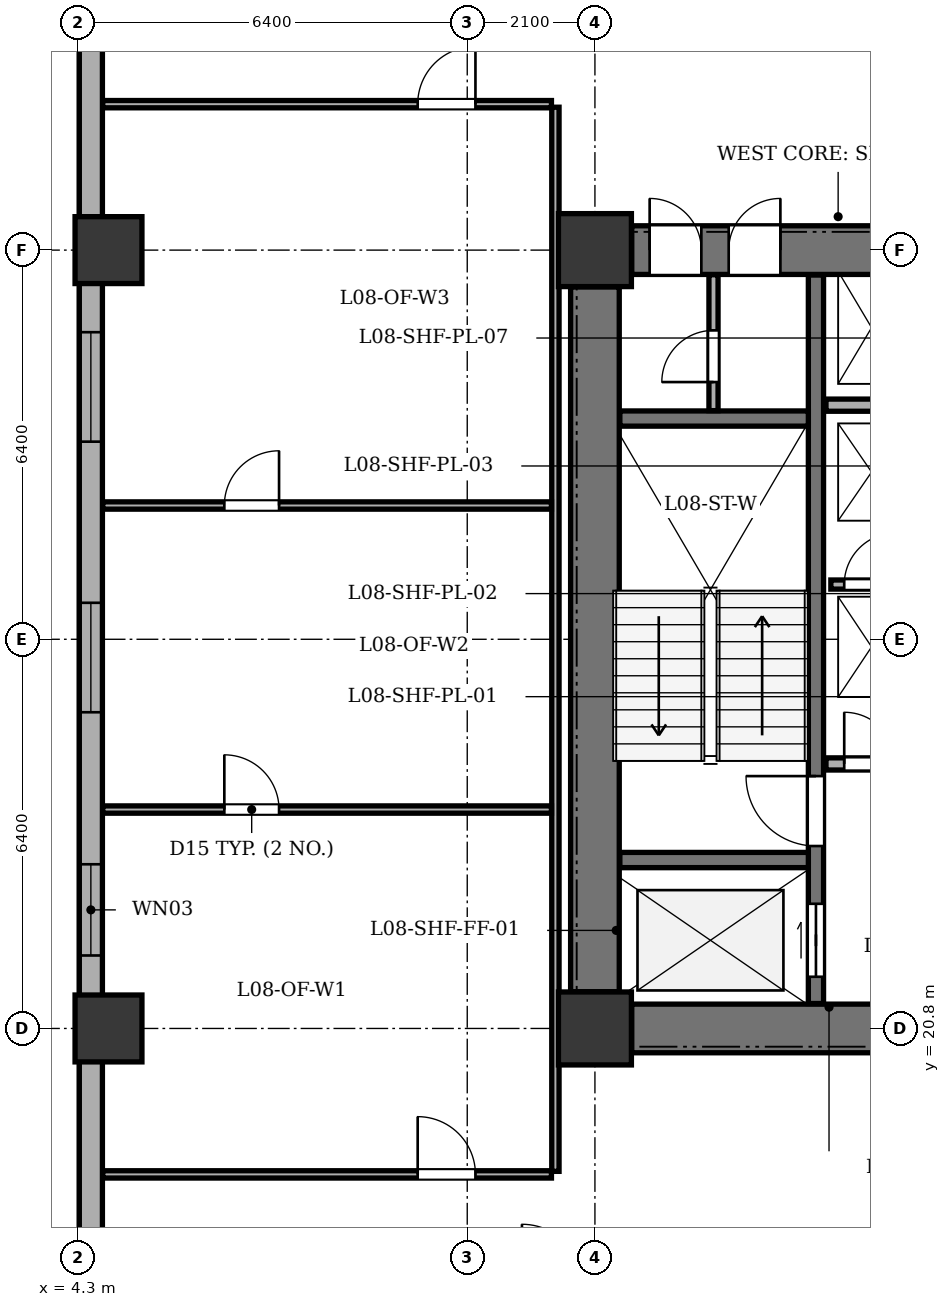
"""IFC4 building model, lengths in metres.
Left out: names, types, materials, properties, quantities, classifications, styles, units other than length and angle.
Written with IfcOpenShell. Run it as: python <this file> out.ifc"""

import sys

from ifc_helpers import new_model, si_unit, direction, frame, frame_2d, origin, origin_2d, place, context, subcontext, project, spatial, rectangle, extrude, element, fill, save


model = new_model("IFC4")
c1 = context("Model", 3, precision=1e-05, world=origin(), true_north=direction((0.0, 1.0)))
c2 = subcontext(c1, "Body", "Model", "MODEL_VIEW")
j1 = project(units=[si_unit("LENGTHUNIT", "METRE"), si_unit("PLANEANGLEUNIT", "RADIAN")], contexts=[c1])
p1 = place(None, origin())
s1 = spatial("IfcSite", under=j1, at=p1, CompositionType="ELEMENT")
p2 = place(p1, origin())
s2 = spatial("IfcBuilding", under=s1, at=p2, CompositionType="ELEMENT")
p3 = place(p2, frame((0.0, 0.0, 36.0)))
s3 = spatial("IfcBuildingStorey", under=s2, at=p3, CompositionType="ELEMENT", Elevation=36.0)
for number, where, z_axis, x_axis in (
    (1, (12.8, 20.8, 0.0), (0.0, 0.0, 1.0), (1.0, 0.0, 0.0)),
    (2, (12.8, 33.6, 0.0), (0.0, 0.0, 1.0), (1.0, 0.0, 0.0)),
):
    element("IfcColumn", number, at=place(p3, frame(where, z_axis=z_axis, x_axis=x_axis)), inside=s3, PredefinedType="COLUMN", context=c2, shape_type="SweptSolid", body=[
        extrude(rectangle(XDim=1.2, YDim=1.2, at=origin_2d()), origin(), (0.0, 0.0, 1.0), 3.9),
    ])
for number, where, z_axis, x_axis in (
    (3, (4.8, 20.8, 0.0), (0.0, 0.0, 1.0), (1.0, 0.0, 0.0)),
    (4, (4.8, 33.6, 0.0), (0.0, 0.0, 1.0), (1.0, 0.0, 0.0)),
):
    element("IfcColumn", number, at=place(p3, frame(where, z_axis=z_axis, x_axis=x_axis)), inside=s3, PredefinedType="COLUMN", context=c2, shape_type="SweptSolid", body=[
        extrude(rectangle(XDim=1.1, YDim=1.1, at=origin_2d()), origin(), (0.0, 0.0, 1.0), 3.9),
    ])
p4 = place(p3, frame((4.51, 6.5, 0.0), z_axis=(0.0, 0.0, 1.0), x_axis=(0.0, 1.0, 0.0)))
e5 = element("IfcWall", 5, at=p4, inside=s3, PredefinedType="STANDARD", context=c2, shape_type="SweptSolid", body=[
    extrude(rectangle(XDim=35.0, YDim=0.38, at=frame_2d((17.5, 0.0))), origin(), (0.0, 0.0, 1.0), 3.135),
])
p5 = place(p4, frame((2.693, 0.0, 0.8)))
e6 = element("IfcOpeningElement", 6, at=p5, cuts=e5, PredefinedType="OPENING", context=c2, shape_type="SweptSolid", body=[
    extrude(rectangle(XDim=1.8, YDim=1.9, at=frame_2d((0.9, 0.95))), frame((0.0, 0.2, 0.0), z_axis=(0.0, -1.0, 0.0), x_axis=(1.0, 0.0, 0.0)), (0.0, 0.0, 1.0), 0.4),
])
p6 = place(p4, frame((7.457, 0.0, 0.8)))
e7 = element("IfcOpeningElement", 7, at=p6, cuts=e5, PredefinedType="OPENING", context=c2, shape_type="SweptSolid", body=[
    extrude(rectangle(XDim=2.4, YDim=1.9, at=frame_2d((1.2, 0.95))), frame((0.0, 0.2, 0.0), z_axis=(0.0, -1.0, 0.0), x_axis=(1.0, 0.0, 0.0)), (0.0, 0.0, 1.0), 0.4),
])
p7 = place(p4, frame((15.5, 0.0, 0.8)))
e8 = element("IfcOpeningElement", 8, at=p7, cuts=e5, PredefinedType="OPENING", context=c2, shape_type="SweptSolid", body=[
    extrude(rectangle(XDim=1.5, YDim=1.9, at=frame_2d((0.75, 0.95))), frame((0.0, 0.2, 0.0), z_axis=(0.0, -1.0, 0.0), x_axis=(1.0, 0.0, 0.0)), (0.0, 0.0, 1.0), 0.4),
])
p8 = place(p4, frame((19.5, 0.0, 0.8)))
e9 = element("IfcOpeningElement", 9, at=p8, cuts=e5, PredefinedType="OPENING", context=c2, shape_type="SweptSolid", body=[
    extrude(rectangle(XDim=1.8, YDim=1.9, at=frame_2d((0.9, 0.95))), frame((0.0, 0.2, 0.0), z_axis=(0.0, -1.0, 0.0), x_axis=(1.0, 0.0, 0.0)), (0.0, 0.0, 1.0), 0.4),
])
p9 = place(p4, frame((23.95, 0.0, 0.8)))
e10 = element("IfcOpeningElement", 10, at=p9, cuts=e5, PredefinedType="OPENING", context=c2, shape_type="SweptSolid", body=[
    extrude(rectangle(XDim=1.8, YDim=1.9, at=frame_2d((0.9, 0.95))), frame((0.0, 0.2, 0.0), z_axis=(0.0, -1.0, 0.0), x_axis=(1.0, 0.0, 0.0)), (0.0, 0.0, 1.0), 0.4),
])
p10 = place(p4, frame((31.175, 0.0, 0.8)))
e11 = element("IfcOpeningElement", 11, at=p10, cuts=e5, PredefinedType="OPENING", context=c2, shape_type="SweptSolid", body=[
    extrude(rectangle(XDim=1.8, YDim=1.9, at=frame_2d((0.9, 0.95))), frame((0.0, 0.2, 0.0), z_axis=(0.0, -1.0, 0.0), x_axis=(1.0, 0.0, 0.0)), (0.0, 0.0, 1.0), 0.4),
])
p11 = place(p3, frame((12.8, 21.405, 0.0), z_axis=(0.0, 0.0, 1.0), x_axis=(0.0, 1.0, 0.0)))
e12 = element("IfcWall", 12, at=p11, inside=s3, PredefinedType="SHEAR", context=c2, shape_type="SweptSolid", body=[
    extrude(rectangle(XDim=11.59, YDim=0.8, at=frame_2d((5.795, 0.0))), origin(), (0.0, 0.0, 1.0), 3.6),
])
p12 = place(p3, frame((13.405, 20.8, 0.0), z_axis=(0.0, 0.0, 1.0), x_axis=(1.0, 0.0, 0.0)))
e13 = element("IfcWall", 13, at=p12, inside=s3, PredefinedType="SHEAR", context=c2, shape_type="SweptSolid", body=[
    extrude(rectangle(XDim=6.79, YDim=0.8, at=frame_2d((3.395, 0.0))), origin(), (0.0, 0.0, 1.0), 3.6),
])
p13 = place(p3, frame((13.405, 33.6, 0.0), z_axis=(0.0, 0.0, 1.0), x_axis=(1.0, 0.0, 0.0)))
e14 = element("IfcWall", 14, at=p13, inside=s3, PredefinedType="SHEAR", context=c2, shape_type="SweptSolid", body=[
    extrude(rectangle(XDim=6.79, YDim=0.8, at=frame_2d((3.395, 0.0))), origin(), (0.0, 0.0, 1.0), 3.6),
])
p14 = place(p13, frame((0.295, 0.0, 0.0)))
e15 = element("IfcOpeningElement", 15, at=p14, cuts=e14, PredefinedType="OPENING", context=c2, shape_type="SweptSolid", body=[
    extrude(rectangle(XDim=0.85, YDim=2.02, at=frame_2d((0.425, 1.01))), frame((0.0, 0.41, 0.0), z_axis=(0.0, -1.0, 0.0), x_axis=(1.0, 0.0, 0.0)), (0.0, 0.0, 1.0), 0.82),
])
p15 = place(p13, frame((1.595, 0.0, 0.0)))
e16 = element("IfcOpeningElement", 16, at=p15, cuts=e14, PredefinedType="OPENING", context=c2, shape_type="SweptSolid", body=[
    extrude(rectangle(XDim=0.85, YDim=2.02, at=frame_2d((0.425, 1.01))), frame((0.0, 0.41, 0.0), z_axis=(0.0, -1.0, 0.0), x_axis=(1.0, 0.0, 0.0)), (0.0, 0.0, 1.0), 0.82),
])
p16 = place(p3, frame((16.435, 21.21, 0.0), z_axis=(0.0, 0.0, 1.0), x_axis=(0.0, 1.0, 0.0)))
e17 = element("IfcWall", 17, at=p16, inside=s3, PredefinedType="SHEAR", context=c2, shape_type="SweptSolid", body=[
    extrude(rectangle(XDim=11.98, YDim=0.25, at=frame_2d((5.99, 0.0))), origin(), (0.0, 0.0, 1.0), 3.6),
])
p17 = place(p16, frame((0.44, 0.0, 0.0)))
e18 = element("IfcOpeningElement", 18, at=p17, cuts=e17, PredefinedType="OPENING", context=c2, shape_type="SweptSolid", body=[
    extrude(rectangle(XDim=1.2, YDim=2.15, at=frame_2d((0.6, 1.075))), frame((0.0, 0.135, 0.0), z_axis=(0.0, -1.0, 0.0), x_axis=(1.0, 0.0, 0.0)), (0.0, 0.0, 1.0), 0.27),
])
p18 = place(p16, frame((2.59, 0.0, 0.0)))
e19 = element("IfcOpeningElement", 19, at=p18, cuts=e17, PredefinedType="OPENING", context=c2, shape_type="SweptSolid", body=[
    extrude(rectangle(XDim=1.15, YDim=2.15, at=frame_2d((0.575, 1.075))), frame((0.0, 0.135, 0.0), z_axis=(0.0, -1.0, 0.0), x_axis=(1.0, 0.0, 0.0)), (0.0, 0.0, 1.0), 0.27),
])
for number, where, z_axis, x_axis in (
    (20, (13.21, 23.57, 0.0), (0.0, 0.0, 1.0), (1.0, 0.0, 0.0)),
    (21, (13.21, 30.83, 0.0), (0.0, 0.0, 1.0), (1.0, 0.0, 0.0)),
):
    element("IfcWall", number, at=place(p3, frame(where, z_axis=z_axis, x_axis=x_axis)), inside=s3, PredefinedType="SHEAR", context=c2, shape_type="SweptSolid", body=[
        extrude(rectangle(XDim=3.1, YDim=0.25, at=frame_2d((1.55, 0.0))), origin(), (0.0, 0.0, 1.0), 3.6),
    ])
p19 = place(p3, frame((16.6, 25.15, 0.0), z_axis=(0.0, 0.0, 1.0), x_axis=(1.0, 0.0, 0.0)))
e22 = element("IfcWall", 22, at=p19, inside=s3, PredefinedType="SOLIDWALL", context=c2, shape_type="SweptSolid", body=[
    extrude(rectangle(XDim=3.79, YDim=0.2, at=frame_2d((1.895, 0.0))), origin(), (0.0, 0.0, 1.0), 3.6),
])
p20 = place(p19, frame((0.3, 0.0, 0.0)))
e23 = element("IfcOpeningElement", 23, at=p20, cuts=e22, PredefinedType="OPENING", context=c2, shape_type="SweptSolid", body=[
    extrude(rectangle(XDim=0.85, YDim=2.02, at=frame_2d((0.425, 1.01))), frame((0.0, 0.11, 0.0), z_axis=(0.0, -1.0, 0.0), x_axis=(1.0, 0.0, 0.0)), (0.0, 0.0, 1.0), 0.22),
])
p21 = place(p3, frame((16.6, 31.05, 0.0), z_axis=(0.0, 0.0, 1.0), x_axis=(1.0, 0.0, 0.0)))
e24 = element("IfcWall", 24, at=p21, inside=s3, PredefinedType="SOLIDWALL", context=c2, shape_type="SweptSolid", body=[
    extrude(rectangle(XDim=3.85, YDim=0.2, at=frame_2d((1.925, 0.0))), origin(), (0.0, 0.0, 1.0), 3.6),
])
p22 = place(p3, frame((14.75, 30.96, 0.0), z_axis=(0.0, 0.0, 1.0), x_axis=(0.0, 1.0, 0.0)))
e25 = element("IfcWall", 25, at=p22, inside=s3, PredefinedType="PARTITIONING", context=c2, shape_type="SweptSolid", body=[
    extrude(rectangle(XDim=2.235, YDim=0.15, at=frame_2d((1.118, 0.0))), origin(), (0.0, 0.0, 1.0), 3.6),
])
p23 = place(p22, frame((0.47, 0.0, 0.0)))
e26 = element("IfcOpeningElement", 26, at=p23, cuts=e25, PredefinedType="OPENING", context=c2, shape_type="SweptSolid", body=[
    extrude(rectangle(XDim=0.85, YDim=2.02, at=frame_2d((0.425, 1.01))), frame((0.0, 0.085, 0.0), z_axis=(0.0, -1.0, 0.0), x_axis=(1.0, 0.0, 0.0)), (0.0, 0.0, 1.0), 0.17),
])
p24 = place(p3, frame((16.68, 28.1, 0.0), z_axis=(0.0, 0.0, 1.0), x_axis=(1.0, 0.0, 0.0)))
e27 = element("IfcWall", 27, at=p24, inside=s3, PredefinedType="PARTITIONING", context=c2, shape_type="SweptSolid", body=[
    extrude(rectangle(XDim=1.32, YDim=0.15, at=frame_2d((0.66, 0.0))), origin(), (0.0, 0.0, 1.0), 3.6),
])
p25 = place(p24, frame((0.22, 0.0, 0.0)))
e28 = element("IfcOpeningElement", 28, at=p25, cuts=e27, PredefinedType="OPENING", context=c2, shape_type="SweptSolid", body=[
    extrude(rectangle(XDim=0.85, YDim=2.02, at=frame_2d((0.425, 1.01))), frame((0.0, 0.085, 0.0), z_axis=(0.0, -1.0, 0.0), x_axis=(1.0, 0.0, 0.0)), (0.0, 0.0, 1.0), 0.17),
])
p26 = place(p3, frame((12.15, 18.45, 0.0), z_axis=(0.0, 0.0, 1.0), x_axis=(0.0, 1.0, 0.0)))
e29 = element("IfcWall", 29, at=p26, inside=s3, PredefinedType="PARTITIONING", context=c2, shape_type="SweptSolid", body=[
    extrude(rectangle(XDim=17.5, YDim=0.12, at=frame_2d((8.75, 0.0))), origin(), (0.0, 0.0, 1.0), 3.6),
])
p27 = place(p3, frame((4.705, 18.4, 0.0), z_axis=(0.0, 0.0, 1.0), x_axis=(1.0, 0.0, 0.0)))
e30 = element("IfcWall", 30, at=p27, inside=s3, PredefinedType="PARTITIONING", context=c2, shape_type="SweptSolid", body=[
    extrude(rectangle(XDim=7.38, YDim=0.12, at=frame_2d((3.69, 0.0))), origin(), (0.0, 0.0, 1.0), 3.6),
])
p28 = place(p27, frame((5.18, 0.0, 0.0)))
e31 = element("IfcOpeningElement", 31, at=p28, cuts=e30, PredefinedType="OPENING", context=c2, shape_type="SweptSolid", body=[
    extrude(rectangle(XDim=0.95, YDim=2.1, at=frame_2d((0.475, 1.05))), frame((0.0, 0.07, 0.0), z_axis=(0.0, -1.0, 0.0), x_axis=(1.0, 0.0, 0.0)), (0.0, 0.0, 1.0), 0.14),
])
p29 = place(p3, frame((4.705, 36.0, 0.0), z_axis=(0.0, 0.0, 1.0), x_axis=(1.0, 0.0, 0.0)))
e32 = element("IfcWall", 32, at=p29, inside=s3, PredefinedType="PARTITIONING", context=c2, shape_type="SweptSolid", body=[
    extrude(rectangle(XDim=7.38, YDim=0.12, at=frame_2d((3.69, 0.0))), origin(), (0.0, 0.0, 1.0), 3.6),
])
p30 = place(p29, frame((5.18, 0.0, 0.0)))
e33 = element("IfcOpeningElement", 33, at=p30, cuts=e32, PredefinedType="OPENING", context=c2, shape_type="SweptSolid", body=[
    extrude(rectangle(XDim=0.95, YDim=2.1, at=frame_2d((0.475, 1.05))), frame((0.0, 0.07, 0.0), z_axis=(0.0, -1.0, 0.0), x_axis=(1.0, 0.0, 0.0)), (0.0, 0.0, 1.0), 0.14),
])
p31 = place(p3, frame((4.705, 24.4, 0.0), z_axis=(0.0, 0.0, 1.0), x_axis=(1.0, 0.0, 0.0)))
e34 = element("IfcWall", 34, at=p31, inside=s3, PredefinedType="PARTITIONING", context=c2, shape_type="SweptSolid", body=[
    extrude(rectangle(XDim=7.38, YDim=0.12, at=frame_2d((3.69, 0.0))), origin(), (0.0, 0.0, 1.0), 3.6),
])
p32 = place(p31, frame((2.0, 0.0, 0.0)))
e35 = element("IfcOpeningElement", 35, at=p32, cuts=e34, PredefinedType="OPENING", context=c2, shape_type="SweptSolid", body=[
    extrude(rectangle(XDim=0.9, YDim=2.05, at=frame_2d((0.45, 1.025))), frame((0.0, 0.07, 0.0), z_axis=(0.0, -1.0, 0.0), x_axis=(1.0, 0.0, 0.0)), (0.0, 0.0, 1.0), 0.14),
])
p33 = place(p3, frame((4.705, 29.4, 0.0), z_axis=(0.0, 0.0, 1.0), x_axis=(1.0, 0.0, 0.0)))
e36 = element("IfcWall", 36, at=p33, inside=s3, PredefinedType="PARTITIONING", context=c2, shape_type="SweptSolid", body=[
    extrude(rectangle(XDim=7.38, YDim=0.12, at=frame_2d((3.69, 0.0))), origin(), (0.0, 0.0, 1.0), 3.6),
])
p34 = place(p33, frame((2.0, 0.0, 0.0)))
e37 = element("IfcOpeningElement", 37, at=p34, cuts=e36, PredefinedType="OPENING", context=c2, shape_type="SweptSolid", body=[
    extrude(rectangle(XDim=0.9, YDim=2.05, at=frame_2d((0.45, 1.025))), frame((0.0, 0.07, 0.0), z_axis=(0.0, -1.0, 0.0), x_axis=(1.0, 0.0, 0.0)), (0.0, 0.0, 1.0), 0.14),
])
p35 = place(p7, origin())
e38 = element("IfcWindow", 38, at=p35, inside=s3, PartitioningType="SINGLE_PANEL", PredefinedType="WINDOW", context=c2, shape_type="SweptSolid", body=[
    extrude(rectangle(XDim=1.5, YDim=1.9, at=frame_2d((0.75, 0.95))), frame((0.0, -0.01, 0.0), z_axis=(0.0, -1.0, 0.0), x_axis=(1.0, 0.0, 0.0)), (0.0, 0.0, 1.0), 0.06),
])
fill(e8, e38)
p36 = place(p8, origin())
e39 = element("IfcWindow", 39, at=p36, inside=s3, PartitioningType="SINGLE_PANEL", PredefinedType="WINDOW", context=c2, shape_type="SweptSolid", body=[
    extrude(rectangle(XDim=1.8, YDim=1.9, at=frame_2d((0.9, 0.95))), frame((0.0, -0.01, 0.0), z_axis=(0.0, -1.0, 0.0), x_axis=(1.0, 0.0, 0.0)), (0.0, 0.0, 1.0), 0.06),
])
fill(e9, e39)
p37 = place(p9, origin())
e40 = element("IfcWindow", 40, at=p37, inside=s3, PartitioningType="SINGLE_PANEL", PredefinedType="WINDOW", context=c2, shape_type="SweptSolid", body=[
    extrude(rectangle(XDim=1.8, YDim=1.9, at=frame_2d((0.9, 0.95))), frame((0.0, -0.01, 0.0), z_axis=(0.0, -1.0, 0.0), x_axis=(1.0, 0.0, 0.0)), (0.0, 0.0, 1.0), 0.06),
])
fill(e10, e40)
p38 = place(p14, origin())
e41 = element("IfcDoor", 41, at=p38, inside=s3, OperationType="SINGLE_SWING_LEFT", PredefinedType="DOOR", context=c2, shape_type="SweptSolid", body=[
    extrude(rectangle(XDim=0.85, YDim=2.02, at=frame_2d((0.425, 1.01))), frame((0.0, 0.025, 0.0), z_axis=(0.0, -1.0, 0.0), x_axis=(1.0, 0.0, 0.0)), (0.0, 0.0, 1.0), 0.05),
])
fill(e15, e41)
p39 = place(p15, origin())
e42 = element("IfcDoor", 42, at=p39, inside=s3, OperationType="SINGLE_SWING_RIGHT", PredefinedType="DOOR", context=c2, shape_type="SweptSolid", body=[
    extrude(rectangle(XDim=0.85, YDim=2.02, at=frame_2d((0.425, 1.01))), frame((0.0, 0.025, 0.0), z_axis=(0.0, -1.0, 0.0), x_axis=(1.0, 0.0, 0.0)), (0.0, 0.0, 1.0), 0.05),
])
fill(e16, e42)
p40 = place(p17, origin())
e43 = element("IfcDoor", 43, at=p40, inside=s3, OperationType="DOUBLE_DOOR_SLIDING", PredefinedType="DOOR", context=c2, shape_type="SweptSolid", body=[
    extrude(rectangle(XDim=1.2, YDim=2.15, at=frame_2d((0.6, 1.075))), frame((0.0, 0.025, 0.0), z_axis=(0.0, -1.0, 0.0), x_axis=(1.0, 0.0, 0.0)), (0.0, 0.0, 1.0), 0.05),
])
fill(e18, e43)
p41 = place(p18, origin())
e44 = element("IfcDoor", 44, at=p41, inside=s3, OperationType="SINGLE_SWING_RIGHT", PredefinedType="DOOR", context=c2, shape_type="SweptSolid", body=[
    extrude(rectangle(XDim=1.15, YDim=2.15, at=frame_2d((0.575, 1.075))), frame((0.0, 0.025, 0.0), z_axis=(0.0, -1.0, 0.0), x_axis=(1.0, 0.0, 0.0)), (0.0, 0.0, 1.0), 0.05),
])
fill(e19, e44)
p42 = place(p20, origin())
e45 = element("IfcDoor", 45, at=p42, inside=s3, OperationType="SINGLE_SWING_LEFT", PredefinedType="DOOR", context=c2, shape_type="SweptSolid", body=[
    extrude(rectangle(XDim=0.85, YDim=2.02, at=frame_2d((0.425, 1.01))), frame((0.0, 0.025, 0.0), z_axis=(0.0, -1.0, 0.0), x_axis=(1.0, 0.0, 0.0)), (0.0, 0.0, 1.0), 0.05),
])
fill(e23, e45)
p43 = place(p23, origin())
e46 = element("IfcDoor", 46, at=p43, inside=s3, OperationType="SINGLE_SWING_LEFT", PredefinedType="DOOR", context=c2, shape_type="SweptSolid", body=[
    extrude(rectangle(XDim=0.85, YDim=2.02, at=frame_2d((0.425, 1.01))), frame((0.0, 0.025, 0.0), z_axis=(0.0, -1.0, 0.0), x_axis=(1.0, 0.0, 0.0)), (0.0, 0.0, 1.0), 0.05),
])
fill(e26, e46)
p44 = place(p25, origin())
e47 = element("IfcDoor", 47, at=p44, inside=s3, OperationType="SINGLE_SWING_RIGHT", PredefinedType="DOOR", context=c2, shape_type="SweptSolid", body=[
    extrude(rectangle(XDim=0.85, YDim=2.02, at=frame_2d((0.425, 1.01))), frame((0.0, 0.025, 0.0), z_axis=(0.0, -1.0, 0.0), x_axis=(1.0, 0.0, 0.0)), (0.0, 0.0, 1.0), 0.05),
])
fill(e28, e47)
p45 = place(p32, origin())
e48 = element("IfcDoor", 48, at=p45, inside=s3, OperationType="SINGLE_SWING_LEFT", PredefinedType="DOOR", context=c2, shape_type="SweptSolid", body=[
    extrude(rectangle(XDim=0.9, YDim=2.05, at=frame_2d((0.45, 1.025))), frame((0.0, 0.025, 0.0), z_axis=(0.0, -1.0, 0.0), x_axis=(1.0, 0.0, 0.0)), (0.0, 0.0, 1.0), 0.05),
])
fill(e35, e48)
p46 = place(p34, origin())
e49 = element("IfcDoor", 49, at=p46, inside=s3, OperationType="SINGLE_SWING_RIGHT", PredefinedType="DOOR", context=c2, shape_type="SweptSolid", body=[
    extrude(rectangle(XDim=0.9, YDim=2.05, at=frame_2d((0.45, 1.025))), frame((0.0, 0.025, 0.0), z_axis=(0.0, -1.0, 0.0), x_axis=(1.0, 0.0, 0.0)), (0.0, 0.0, 1.0), 0.05),
])
fill(e37, e49)
p47 = place(p28, origin())
e50 = element("IfcDoor", 50, at=p47, inside=s3, OperationType="SINGLE_SWING_LEFT", PredefinedType="DOOR", context=c2, shape_type="SweptSolid", body=[
    extrude(rectangle(XDim=0.95, YDim=2.1, at=frame_2d((0.475, 1.05))), frame((0.0, 0.025, 0.0), z_axis=(0.0, -1.0, 0.0), x_axis=(1.0, 0.0, 0.0)), (0.0, 0.0, 1.0), 0.05),
])
fill(e31, e50)
p48 = place(p30, origin())
e51 = element("IfcDoor", 51, at=p48, inside=s3, OperationType="SINGLE_SWING_RIGHT", PredefinedType="DOOR", context=c2, shape_type="SweptSolid", body=[
    extrude(rectangle(XDim=0.95, YDim=2.1, at=frame_2d((0.475, 1.05))), frame((0.0, 0.025, 0.0), z_axis=(0.0, -1.0, 0.0), x_axis=(1.0, 0.0, 0.0)), (0.0, 0.0, 1.0), 0.05),
])
fill(e33, e51)
save(model, sys.argv[1])
